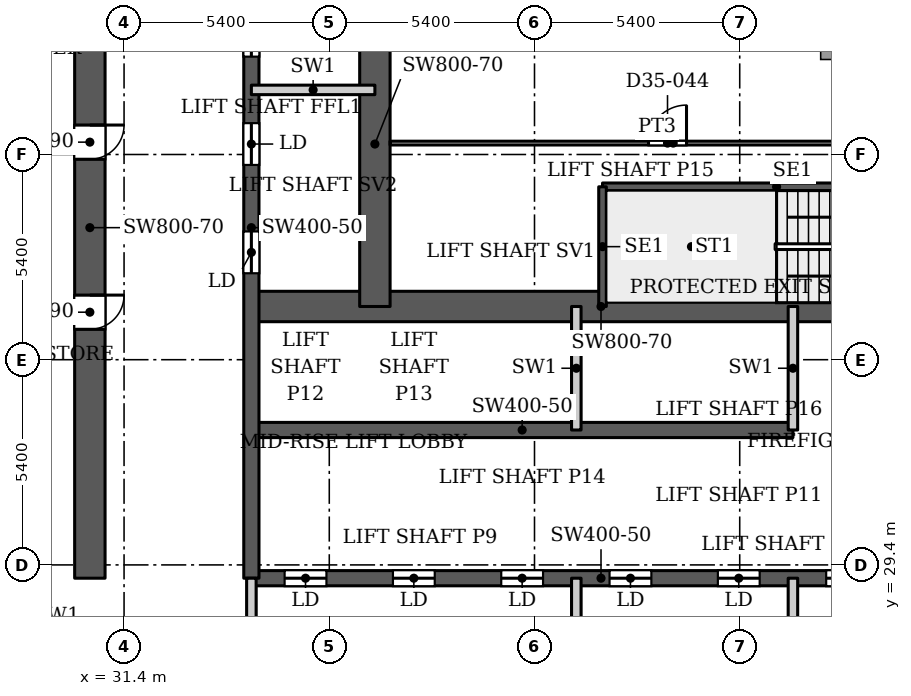
"""IFC4 building model, lengths in metres.
Left out: names, types, materials, properties, quantities, classifications, styles, units other than length and angle.
Written with IfcOpenShell. Run it as: python <this file> out.ifc"""

import sys

from ifc_helpers import new_model, si_unit, direction, frame, frame_2d, origin, place, context, subcontext, project, spatial, rectangle, extrude, source, transform, mapped, element, fill, save


model = new_model("IFC4")
c1 = context("Model", 3, precision=1e-05, world=origin(), true_north=direction((0.0, 1.0)))
c2 = subcontext(c1, "Body", "Model", "MODEL_VIEW")
j1 = project(units=[si_unit("LENGTHUNIT", "METRE"), si_unit("PLANEANGLEUNIT", "RADIAN")], contexts=[c1])
p1 = place(None, origin())
s1 = spatial("IfcSite", under=j1, at=p1, CompositionType="ELEMENT")
p2 = place(p1, origin())
s2 = spatial("IfcBuilding", under=s1, at=p2, CompositionType="ELEMENT")
p3 = place(p2, frame((0.0, 0.0, 152.6)))
s3 = spatial("IfcBuildingStorey", under=s2, at=p3, CompositionType="ELEMENT", Elevation=152.6)
p4 = place(p3, frame((34.75, 29.05, 0.0), z_axis=(0.0, 0.0, 1.0), x_axis=(1.0, 0.0, 0.0)))
e1 = element("IfcWall", 1, at=p4, inside=s3, PredefinedType="SHEAR", context=c2, shape_type="SweptSolid", body=[
    extrude(rectangle(XDim=18.4, YDim=0.4, at=frame_2d((9.2, 0.0))), origin(), (0.0, 0.0, 1.0), 3.9),
])
p5 = place(p4, frame((0.875, 0.0, 0.0)))
e2 = element("IfcOpeningElement", 2, at=p5, cuts=e1, PredefinedType="OPENING", context=c2, shape_type="SweptSolid", body=[
    extrude(rectangle(XDim=1.1, YDim=2.2, at=frame_2d((0.55, 1.1))), frame((0.0, 0.21, 0.0), z_axis=(0.0, -1.0, 0.0), x_axis=(1.0, 0.0, 0.0)), (0.0, 0.0, 1.0), 0.42),
])
p6 = place(p4, frame((3.725, 0.0, 0.0)))
e3 = element("IfcOpeningElement", 3, at=p6, cuts=e1, PredefinedType="OPENING", context=c2, shape_type="SweptSolid", body=[
    extrude(rectangle(XDim=1.1, YDim=2.2, at=frame_2d((0.55, 1.1))), frame((0.0, 0.21, 0.0), z_axis=(0.0, -1.0, 0.0), x_axis=(1.0, 0.0, 0.0)), (0.0, 0.0, 1.0), 0.42),
])
p7 = place(p4, frame((6.575, 0.0, 0.0)))
e4 = element("IfcOpeningElement", 4, at=p7, cuts=e1, PredefinedType="OPENING", context=c2, shape_type="SweptSolid", body=[
    extrude(rectangle(XDim=1.1, YDim=2.2, at=frame_2d((0.55, 1.1))), frame((0.0, 0.21, 0.0), z_axis=(0.0, -1.0, 0.0), x_axis=(1.0, 0.0, 0.0)), (0.0, 0.0, 1.0), 0.42),
])
p8 = place(p4, frame((9.425, 0.0, 0.0)))
e5 = element("IfcOpeningElement", 5, at=p8, cuts=e1, PredefinedType="OPENING", context=c2, shape_type="SweptSolid", body=[
    extrude(rectangle(XDim=1.1, YDim=2.2, at=frame_2d((0.55, 1.1))), frame((0.0, 0.21, 0.0), z_axis=(0.0, -1.0, 0.0), x_axis=(1.0, 0.0, 0.0)), (0.0, 0.0, 1.0), 0.42),
])
p9 = place(p4, frame((12.275, 0.0, 0.0)))
e6 = element("IfcOpeningElement", 6, at=p9, cuts=e1, PredefinedType="OPENING", context=c2, shape_type="SweptSolid", body=[
    extrude(rectangle(XDim=1.1, YDim=2.2, at=frame_2d((0.55, 1.1))), frame((0.0, 0.21, 0.0), z_axis=(0.0, -1.0, 0.0), x_axis=(1.0, 0.0, 0.0)), (0.0, 0.0, 1.0), 0.42),
])
p10 = place(p4, frame((15.125, 0.0, 0.0)))
e7 = element("IfcOpeningElement", 7, at=p10, cuts=e1, PredefinedType="OPENING", context=c2, shape_type="SweptSolid", body=[
    extrude(rectangle(XDim=1.1, YDim=2.2, at=frame_2d((0.55, 1.1))), frame((0.0, 0.21, 0.0), z_axis=(0.0, -1.0, 0.0), x_axis=(1.0, 0.0, 0.0)), (0.0, 0.0, 1.0), 0.42),
])
p11 = place(p3, frame((34.75, 32.95, 0.0), z_axis=(0.0, 0.0, 1.0), x_axis=(1.0, 0.0, 0.0)))
e8 = element("IfcWall", 8, at=p11, inside=s3, PredefinedType="SHEAR", context=c2, shape_type="SweptSolid", body=[
    extrude(rectangle(XDim=14.25, YDim=0.4, at=frame_2d((7.125, 0.0))), origin(), (0.0, 0.0, 1.0), 3.9),
])
p12 = place(p3, frame((34.75, 36.2, 0.0), z_axis=(0.0, 0.0, 1.0), x_axis=(1.0, 0.0, 0.0)))
e9 = element("IfcWall", 9, at=p12, inside=s3, PredefinedType="SHEAR", context=c2, shape_type="SweptSolid", body=[
    extrude(rectangle(XDim=18.4, YDim=0.8, at=frame_2d((9.2, 0.0))), origin(), (0.0, 0.0, 1.0), 3.9),
])
p13 = place(p12, frame((16.9, 0.0, 0.0)))
e10 = element("IfcOpeningElement", 10, at=p13, cuts=e9, PredefinedType="OPENING", context=c2, shape_type="SweptSolid", body=[
    extrude(rectangle(XDim=1.0, YDim=2.2, at=frame_2d((0.5, 1.1))), frame((0.0, 0.41, 0.0), z_axis=(0.0, -1.0, 0.0), x_axis=(1.0, 0.0, 0.0)), (0.0, 0.0, 1.0), 0.82),
])
p14 = place(p3, frame((34.75, 29.05, 0.0), z_axis=(0.0, 0.0, 1.0), x_axis=(0.0, 1.0, 0.0)))
e11 = element("IfcWall", 11, at=p14, inside=s3, PredefinedType="SHEAR", context=c2, shape_type="SweptSolid", body=[
    extrude(rectangle(XDim=18.45, YDim=0.4, at=frame_2d((9.225, 0.0))), origin(), (0.0, 0.0, 1.0), 3.9),
])
p15 = place(p14, frame((8.025, 0.0, 0.0)))
e12 = element("IfcOpeningElement", 12, at=p15, cuts=e11, PredefinedType="OPENING", context=c2, shape_type="SweptSolid", body=[
    extrude(rectangle(XDim=1.1, YDim=2.2, at=frame_2d((0.55, 1.1))), frame((0.0, 0.21, 0.0), z_axis=(0.0, -1.0, 0.0), x_axis=(1.0, 0.0, 0.0)), (0.0, 0.0, 1.0), 0.42),
])
p16 = place(p14, frame((10.875, 0.0, 0.0)))
e13 = element("IfcOpeningElement", 13, at=p16, cuts=e11, PredefinedType="OPENING", context=c2, shape_type="SweptSolid", body=[
    extrude(rectangle(XDim=1.1, YDim=2.2, at=frame_2d((0.55, 1.1))), frame((0.0, 0.21, 0.0), z_axis=(0.0, -1.0, 0.0), x_axis=(1.0, 0.0, 0.0)), (0.0, 0.0, 1.0), 0.42),
])
p17 = place(p14, frame((13.725, 0.0, 0.0)))
e14 = element("IfcOpeningElement", 14, at=p17, cuts=e11, PredefinedType="OPENING", context=c2, shape_type="SweptSolid", body=[
    extrude(rectangle(XDim=1.1, YDim=2.2, at=frame_2d((0.55, 1.1))), frame((0.0, 0.21, 0.0), z_axis=(0.0, -1.0, 0.0), x_axis=(1.0, 0.0, 0.0)), (0.0, 0.0, 1.0), 0.42),
])
p18 = place(p14, frame((15.95, 0.0, 0.0)))
e15 = element("IfcOpeningElement", 15, at=p18, cuts=e11, PredefinedType="OPENING", context=c2, shape_type="SweptSolid", body=[
    extrude(rectangle(XDim=1.1, YDim=2.2, at=frame_2d((0.55, 1.1))), frame((0.0, 0.21, 0.0), z_axis=(0.0, -1.0, 0.0), x_axis=(1.0, 0.0, 0.0)), (0.0, 0.0, 1.0), 0.42),
])
p19 = place(p3, frame((38.0, 36.2, 0.0), z_axis=(0.0, 0.0, 1.0), x_axis=(0.0, 1.0, 0.0)))
e16 = element("IfcWall", 16, at=p19, inside=s3, PredefinedType="SHEAR", context=c2, shape_type="SweptSolid", body=[
    extrude(rectangle(XDim=8.55, YDim=0.8, at=frame_2d((4.275, 0.0))), origin(), (0.0, 0.0, 1.0), 3.9),
])
p20 = place(p3, frame((30.5, 29.05, 0.0), z_axis=(0.0, 0.0, 1.0), x_axis=(0.0, 1.0, 0.0)))
e17 = element("IfcWall", 17, at=p20, inside=s3, PredefinedType="SHEAR", context=c2, shape_type="SweptSolid", body=[
    extrude(rectangle(XDim=18.45, YDim=0.8, at=frame_2d((9.225, 0.0))), origin(), (0.0, 0.0, 1.0), 3.9),
])
p21 = place(p20, frame((6.55, 0.0, 0.0)))
e18 = element("IfcOpeningElement", 18, at=p21, cuts=e17, PredefinedType="OPENING", context=c2, shape_type="SweptSolid", body=[
    extrude(rectangle(XDim=0.9, YDim=2.2, at=frame_2d((0.45, 1.1))), frame((0.0, 0.41, 0.0), z_axis=(0.0, -1.0, 0.0), x_axis=(1.0, 0.0, 0.0)), (0.0, 0.0, 1.0), 0.82),
])
p22 = place(p20, frame((11.025, 0.0, 0.0)))
e19 = element("IfcOpeningElement", 19, at=p22, cuts=e17, PredefinedType="OPENING", context=c2, shape_type="SweptSolid", body=[
    extrude(rectangle(XDim=0.9, YDim=2.2, at=frame_2d((0.45, 1.1))), frame((0.0, 0.41, 0.0), z_axis=(0.0, -1.0, 0.0), x_axis=(1.0, 0.0, 0.0)), (0.0, 0.0, 1.0), 0.82),
])
p23 = place(p3, frame((29.712, 26.072, 0.0), z_axis=(0.0, 0.0, 1.0), x_axis=(-0.511028049012, 0.859564036662, 0.0)))
e20 = element("IfcWall", 20, at=p23, inside=s3, PredefinedType="SOLIDWALL", context=c2, shape_type="SweptSolid", body=[
    extrude(rectangle(XDim=4.634, YDim=0.25, at=frame_2d((2.317, 0.0))), origin(), (0.0, 0.0, 1.0), 3.147),
])
p24 = place(p3, frame((27.195, 31.969, 0.0), z_axis=(0.0, 0.0, 1.0), x_axis=(0.052554995867, 0.998618031286, 0.0)))
e21 = element("IfcWall", 21, at=p24, inside=s3, PredefinedType="SOLIDWALL", context=c2, shape_type="SweptSolid", body=[
    extrude(rectangle(XDim=66.787, YDim=0.25, at=frame_2d((33.394, 0.0))), origin(), (0.0, 0.0, 1.0), 3.75),
])
p25 = place(p3, frame((43.99, 39.35, 0.0), z_axis=(0.0, 0.0, 1.0), x_axis=(1.0, 0.0, 0.0)))
e22 = element("IfcWall", 22, at=p25, inside=s3, PredefinedType="SHEAR", context=c2, shape_type="SweptSolid", body=[
    extrude(rectangle(XDim=9.16, YDim=0.2, at=frame_2d((4.58, 0.0))), origin(), (0.0, 0.0, 1.0), 3.9),
])
p26 = place(p3, frame((43.99, 36.2, 0.0), z_axis=(0.0, 0.0, 1.0), x_axis=(0.0, 1.0, 0.0)))
e23 = element("IfcWall", 23, at=p26, inside=s3, PredefinedType="SHEAR", context=c2, shape_type="SweptSolid", body=[
    extrude(rectangle(XDim=3.15, YDim=0.2, at=frame_2d((1.575, 0.0))), origin(), (0.0, 0.0, 1.0), 3.9),
])
for number, where, z_axis, x_axis in (
    (24, (34.75, 25.8, 0.0), (0.0, 0.0, 1.0), (0.0, 1.0, 0.0)),
    (25, (43.3, 25.8, 0.0), (0.0, 0.0, 1.0), (0.0, 1.0, 0.0)),
    (26, (43.3, 32.95, 0.0), (0.0, 0.0, 1.0), (0.0, 1.0, 0.0)),
    (27, (49.0, 25.8, 0.0), (0.0, 0.0, 1.0), (0.0, 1.0, 0.0)),
    (28, (49.0, 32.95, 0.0), (0.0, 0.0, 1.0), (0.0, 1.0, 0.0)),
    (29, (34.75, 41.9, 0.0), (0.0, 0.0, 1.0), (1.0, 0.0, 0.0)),
):
    element("IfcWall", number, at=place(p3, frame(where, z_axis=z_axis, x_axis=x_axis)), inside=s3, PredefinedType="PARTITIONING", context=c2, shape_type="SweptSolid", body=[
        extrude(rectangle(XDim=3.25, YDim=0.25, at=frame_2d((1.625, 0.0))), origin(), (0.0, 0.0, 1.0), 3.9),
    ])
p27 = place(p3, frame((38.399, 40.5, 0.0), z_axis=(0.0, 0.0, 1.0), x_axis=(1.0, 0.0, 0.0)))
e30 = element("IfcWall", 30, at=p27, inside=s3, PredefinedType="PARTITIONING", context=c2, shape_type="SweptSolid", body=[
    extrude(rectangle(XDim=14.901, YDim=0.1, at=frame_2d((7.451, 0.0))), origin(), (0.0, 0.0, 1.0), 3.6),
])
p28 = place(p27, frame((6.801, 0.0, 0.0)))
e31 = element("IfcOpeningElement", 31, at=p28, cuts=e30, PredefinedType="OPENING", context=c2, shape_type="SweptSolid", body=[
    extrude(rectangle(XDim=1.0, YDim=2.1, at=frame_2d((0.5, 1.05))), frame((0.0, 0.06, 0.0), z_axis=(0.0, -1.0, 0.0), x_axis=(1.0, 0.0, 0.0)), (0.0, 0.0, 1.0), 0.12),
])
m1 = source(origin(), c2, "Body", "SweptSolid", [
    extrude(rectangle(XDim=1.1, YDim=2.2, at=frame_2d((0.55, 1.1))), frame((0.0, 0.025, 0.0), z_axis=(0.0, -1.0, 0.0), x_axis=(1.0, 0.0, 0.0)), (0.0, 0.0, 1.0), 0.05),
])
p29 = place(p5, origin())
e32 = element("IfcDoor", 32, at=p29, inside=s3, OperationType="SLIDING_TO_LEFT", PredefinedType="DOOR", context=c2, shape_type="MappedRepresentation", body=[
    mapped(m1, transform((0.0, 0.0, 0.0), x_axis=(1.0, 0.0, 0.0), y_axis=(0.0, 1.0, 0.0), z_axis=(0.0, 0.0, 1.0), scale=1.0)),
])
fill(e2, e32)
p30 = place(p6, origin())
e33 = element("IfcDoor", 33, at=p30, inside=s3, OperationType="SLIDING_TO_LEFT", PredefinedType="DOOR", context=c2, shape_type="MappedRepresentation", body=[
    mapped(m1, transform((0.0, 0.0, 0.0), x_axis=(1.0, 0.0, 0.0), y_axis=(0.0, 1.0, 0.0), z_axis=(0.0, 0.0, 1.0), scale=1.0)),
])
fill(e3, e33)
p31 = place(p7, origin())
e34 = element("IfcDoor", 34, at=p31, inside=s3, OperationType="SLIDING_TO_LEFT", PredefinedType="DOOR", context=c2, shape_type="MappedRepresentation", body=[
    mapped(m1, transform((0.0, 0.0, 0.0), x_axis=(1.0, 0.0, 0.0), y_axis=(0.0, 1.0, 0.0), z_axis=(0.0, 0.0, 1.0), scale=1.0)),
])
fill(e4, e34)
p32 = place(p8, origin())
e35 = element("IfcDoor", 35, at=p32, inside=s3, OperationType="SLIDING_TO_LEFT", PredefinedType="DOOR", context=c2, shape_type="MappedRepresentation", body=[
    mapped(m1, transform((0.0, 0.0, 0.0), x_axis=(1.0, 0.0, 0.0), y_axis=(0.0, 1.0, 0.0), z_axis=(0.0, 0.0, 1.0), scale=1.0)),
])
fill(e5, e35)
p33 = place(p9, origin())
e36 = element("IfcDoor", 36, at=p33, inside=s3, OperationType="SLIDING_TO_LEFT", PredefinedType="DOOR", context=c2, shape_type="MappedRepresentation", body=[
    mapped(m1, transform((0.0, 0.0, 0.0), x_axis=(1.0, 0.0, 0.0), y_axis=(0.0, 1.0, 0.0), z_axis=(0.0, 0.0, 1.0), scale=1.0)),
])
fill(e6, e36)
p34 = place(p15, origin())
e37 = element("IfcDoor", 37, at=p34, inside=s3, OperationType="SLIDING_TO_LEFT", PredefinedType="DOOR", context=c2, shape_type="MappedRepresentation", body=[
    mapped(m1, transform((0.0, 0.0, 0.0), x_axis=(1.0, 0.0, 0.0), y_axis=(0.0, 1.0, 0.0), z_axis=(0.0, 0.0, 1.0), scale=1.0)),
])
fill(e12, e37)
p35 = place(p16, origin())
e38 = element("IfcDoor", 38, at=p35, inside=s3, OperationType="SLIDING_TO_LEFT", PredefinedType="DOOR", context=c2, shape_type="MappedRepresentation", body=[
    mapped(m1, transform((0.0, 0.0, 0.0), x_axis=(1.0, 0.0, 0.0), y_axis=(0.0, 1.0, 0.0), z_axis=(0.0, 0.0, 1.0), scale=1.0)),
])
fill(e13, e38)
p36 = place(p17, origin())
e39 = element("IfcDoor", 39, at=p36, inside=s3, OperationType="SLIDING_TO_LEFT", PredefinedType="DOOR", context=c2, shape_type="MappedRepresentation", body=[
    mapped(m1, transform((0.0, 0.0, 0.0), x_axis=(1.0, 0.0, 0.0), y_axis=(0.0, 1.0, 0.0), z_axis=(0.0, 0.0, 1.0), scale=1.0)),
])
fill(e14, e39)
p37 = place(p10, origin())
e40 = element("IfcDoor", 40, at=p37, inside=s3, OperationType="SLIDING_TO_LEFT", PredefinedType="DOOR", context=c2, shape_type="MappedRepresentation", body=[
    mapped(m1, transform((0.0, 0.0, 0.0), x_axis=(1.0, 0.0, 0.0), y_axis=(0.0, 1.0, 0.0), z_axis=(0.0, 0.0, 1.0), scale=1.0)),
])
fill(e7, e40)
m2 = source(origin(), c2, "Body", "SweptSolid", [
    extrude(rectangle(XDim=0.9, YDim=2.2, at=frame_2d((0.45, 1.1))), frame((0.0, 0.025, 0.0), z_axis=(0.0, -1.0, 0.0), x_axis=(1.0, 0.0, 0.0)), (0.0, 0.0, 1.0), 0.05),
])
p38 = place(p21, origin())
e41 = element("IfcDoor", 41, at=p38, inside=s3, OperationType="SINGLE_SWING_RIGHT", PredefinedType="DOOR", context=c2, shape_type="MappedRepresentation", body=[
    mapped(m2, transform((0.0, 0.0, 0.0), x_axis=(1.0, 0.0, 0.0), y_axis=(0.0, 1.0, 0.0), z_axis=(0.0, 0.0, 1.0), scale=1.0)),
])
fill(e18, e41)
p39 = place(p22, origin())
e42 = element("IfcDoor", 42, at=p39, inside=s3, OperationType="SINGLE_SWING_RIGHT", PredefinedType="DOOR", context=c2, shape_type="MappedRepresentation", body=[
    mapped(m2, transform((0.0, 0.0, 0.0), x_axis=(1.0, 0.0, 0.0), y_axis=(0.0, 1.0, 0.0), z_axis=(0.0, 0.0, 1.0), scale=1.0)),
])
fill(e19, e42)
m3 = source(origin(), c2, "Body", "SweptSolid", [
    extrude(rectangle(XDim=1.0, YDim=2.1, at=frame_2d((0.5, 1.05))), frame((0.0, 0.025, 0.0), z_axis=(0.0, -1.0, 0.0), x_axis=(1.0, 0.0, 0.0)), (0.0, 0.0, 1.0), 0.05),
])
p40 = place(p28, origin())
e43 = element("IfcDoor", 43, at=p40, inside=s3, OperationType="SINGLE_SWING_LEFT", PredefinedType="DOOR", context=c2, shape_type="MappedRepresentation", body=[
    mapped(m3, transform((0.0, 0.0, 0.0), x_axis=(1.0, 0.0, 0.0), y_axis=(0.0, 1.0, 0.0), z_axis=(0.0, 0.0, 1.0), scale=1.0)),
])
fill(e31, e43)
save(model, sys.argv[1])
